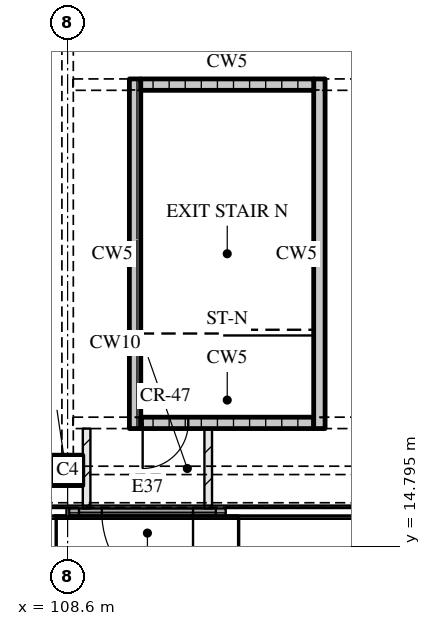
"""IFC4 building model, lengths in metres.
Left out: names, types, materials, properties, quantities, classifications, styles, units other than length and angle.
Written with IfcOpenShell. Run it as: python <this file> out.ifc"""

import sys

from ifc_helpers import new_model, si_unit, direction, frame, frame_2d, origin, origin_2d, place, context, subcontext, project, spatial, rectangle, extrude, element, fill, save


model = new_model("IFC4")
c1 = context("Model", 3, precision=1e-05, world=origin(), true_north=direction((0.0, 1.0)))
c2 = subcontext(c1, "Body", "Model", "MODEL_VIEW")
j1 = project(units=[si_unit("LENGTHUNIT", "METRE"), si_unit("PLANEANGLEUNIT", "RADIAN")], contexts=[c1])
p1 = place(None, origin())
s1 = spatial("IfcSite", under=j1, at=p1, CompositionType="ELEMENT")
p2 = place(p1, origin())
s2 = spatial("IfcBuilding", under=s1, at=p2, CompositionType="ELEMENT")
p3 = place(p2, origin())
s3 = spatial("IfcBuildingStorey", under=s2, at=p3, CompositionType="ELEMENT", Elevation=0.0)
p4 = place(p3, frame((108.6, 16.8, 0.0), z_axis=(0.0, 0.0, 1.0), x_axis=(1.0, 0.0, 0.0)))
e1 = element("IfcColumn", 1, at=p4, inside=s3, PredefinedType="COLUMN", context=c2, shape_type="SweptSolid", body=[
    extrude(rectangle(XDim=0.8, YDim=0.8, at=origin_2d()), origin(), (0.0, 0.0, 1.0), 9.0),
])
p5 = place(p3, frame((112.76, 15.7, 0.0), z_axis=(0.0, 0.0, 1.0), x_axis=(-1.0, 0.0, 0.0)))
e2 = element("IfcWall", 2, at=p5, inside=s3, PredefinedType="SOLIDWALL", context=c2, shape_type="SweptSolid", body=[
    extrude(rectangle(XDim=4.12, YDim=0.2, at=frame_2d((2.06, 0.0))), origin(), (0.0, 0.0, 1.0), 8.7),
])
p6 = place(p5, frame((0.86, 0.0, 0.0)))
e3 = element("IfcOpeningElement", 3, at=p6, cuts=e2, PredefinedType="OPENING", context=c2, shape_type="SweptSolid", body=[
    extrude(rectangle(XDim=2.4, YDim=2.4, at=frame_2d((1.2, 1.2))), frame((0.0, 0.11, 0.0), z_axis=(0.0, -1.0, 0.0), x_axis=(1.0, 0.0, 0.0)), (0.0, 0.0, 1.0), 0.22),
])
p7 = place(p5, frame((0.26, 0.0, 2.7)))
e4 = element("IfcOpeningElement", 4, at=p7, cuts=e2, PredefinedType="OPENING", context=c2, shape_type="SweptSolid", body=[
    extrude(rectangle(XDim=3.6, YDim=5.6, at=frame_2d((1.8, 2.8))), frame((0.0, 0.11, 0.0), z_axis=(0.0, -1.0, 0.0), x_axis=(1.0, 0.0, 0.0)), (0.0, 0.0, 1.0), 0.22),
])
p8 = place(p3, frame((110.375, 17.9, 0.0), z_axis=(0.0, 0.0, 1.0), x_axis=(0.0, 1.0, 0.0)))
e5 = element("IfcWall", 5, at=p8, inside=s3, PredefinedType="SOLIDWALL", context=c2, shape_type="SweptSolid", body=[
    extrude(rectangle(XDim=9.2, YDim=0.3, at=frame_2d((4.6, 0.0))), origin(), (0.0, 0.0, 1.0), 8.7),
])
p9 = place(p3, frame((110.525, 18.05, 0.0), z_axis=(0.0, 0.0, 1.0), x_axis=(1.0, 0.0, 0.0)))
e6 = element("IfcWall", 6, at=p9, inside=s3, PredefinedType="SOLIDWALL", context=c2, shape_type="SweptSolid", body=[
    extrude(rectangle(XDim=4.55, YDim=0.3, at=frame_2d((2.275, 0.0))), origin(), (0.0, 0.0, 1.0), 8.7),
])
p10 = place(p9, frame((0.05, 0.0, 0.0)))
e7 = element("IfcOpeningElement", 7, at=p10, cuts=e6, PredefinedType="OPENING", context=c2, shape_type="SweptSolid", body=[
    extrude(rectangle(XDim=1.2, YDim=2.1, at=frame_2d((0.6, 1.05))), frame((0.0, 0.16, 0.0), z_axis=(0.0, -1.0, 0.0), x_axis=(1.0, 0.0, 0.0)), (0.0, 0.0, 1.0), 0.32),
])
p11 = place(p3, frame((115.225, 17.9, 0.0), z_axis=(0.0, 0.0, 1.0), x_axis=(0.0, 1.0, 0.0)))
e8 = element("IfcWall", 8, at=p11, inside=s3, PredefinedType="SOLIDWALL", context=c2, shape_type="SweptSolid", body=[
    extrude(rectangle(XDim=9.2, YDim=0.3, at=frame_2d((4.6, 0.0))), origin(), (0.0, 0.0, 1.0), 8.7),
])
p12 = place(p3, frame((110.525, 26.95, 0.0), z_axis=(0.0, 0.0, 1.0), x_axis=(1.0, 0.0, 0.0)))
e9 = element("IfcWall", 9, at=p12, inside=s3, PredefinedType="SOLIDWALL", context=c2, shape_type="SweptSolid", body=[
    extrude(rectangle(XDim=4.55, YDim=0.3, at=frame_2d((2.275, 0.0))), origin(), (0.0, 0.0, 1.0), 8.7),
])
for number, where, z_axis, x_axis in (
    (10, (109.1, 15.8, 0.0), (0.0, 0.0, 1.0), (0.0, 1.0, 0.0)),
    (11, (112.3, 15.8, 0.0), (0.0, 0.0, 1.0), (0.0, 1.0, 0.0)),
):
    element("IfcWall", number, at=place(p3, frame(where, z_axis=z_axis, x_axis=x_axis)), inside=s3, PredefinedType="PARTITIONING", context=c2, shape_type="SweptSolid", body=[
        extrude(rectangle(XDim=2.1, YDim=0.2, at=frame_2d((1.05, 0.0))), origin(), (0.0, 0.0, 1.0), 8.7),
    ])
p13 = place(p6, origin())
e12 = element("IfcDoor", 12, at=p13, inside=s3, OperationType="DOUBLE_DOOR_SINGLE_SWING", PredefinedType="DOOR", context=c2, shape_type="SweptSolid", body=[
    extrude(rectangle(XDim=2.4, YDim=2.4, at=frame_2d((1.2, 1.2))), frame((0.0, 0.025, 0.0), z_axis=(0.0, -1.0, 0.0), x_axis=(1.0, 0.0, 0.0)), (0.0, 0.0, 1.0), 0.05),
])
fill(e3, e12)
p14 = place(p7, origin())
e13 = element("IfcWindow", 13, at=p14, inside=s3, PartitioningType="SINGLE_PANEL", PredefinedType="WINDOW", context=c2, shape_type="SweptSolid", body=[
    extrude(rectangle(XDim=3.6, YDim=5.6, at=frame_2d((1.8, 2.8))), frame((0.0, 0.03, 0.0), z_axis=(0.0, -1.0, 0.0), x_axis=(1.0, 0.0, 0.0)), (0.0, 0.0, 1.0), 0.06),
])
fill(e4, e13)
p15 = place(p10, origin())
e14 = element("IfcDoor", 14, at=p15, inside=s3, OperationType="SINGLE_SWING_RIGHT", PredefinedType="DOOR", context=c2, shape_type="SweptSolid", body=[
    extrude(rectangle(XDim=1.2, YDim=2.1, at=frame_2d((0.6, 1.05))), frame((0.0, 0.025, 0.0), z_axis=(0.0, -1.0, 0.0), x_axis=(1.0, 0.0, 0.0)), (0.0, 0.0, 1.0), 0.05),
])
fill(e7, e14)
save(model, sys.argv[1])
